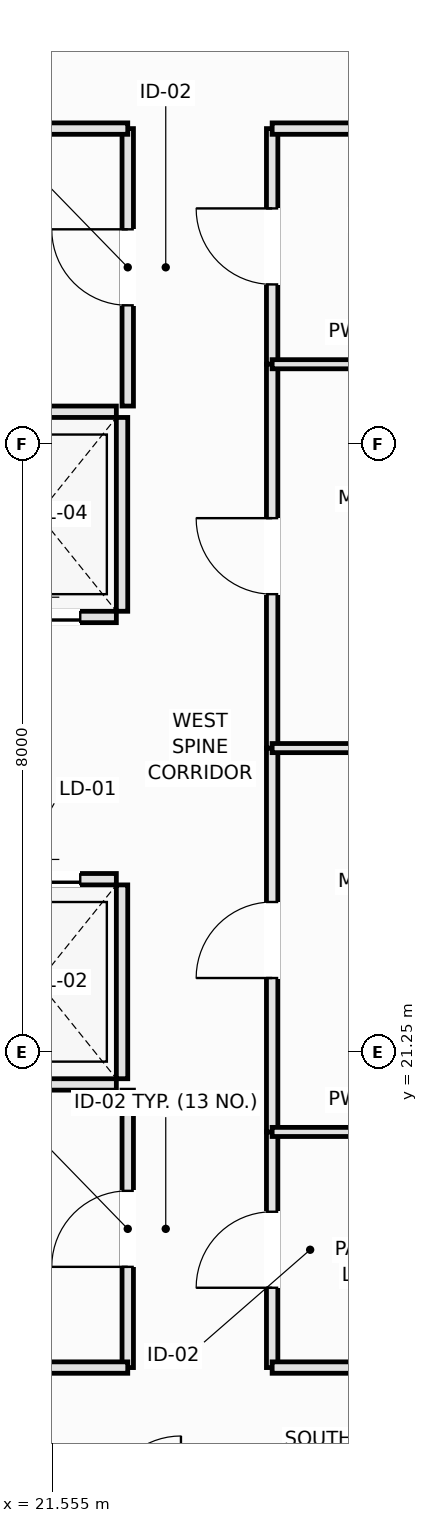
"""IFC4 building model, lengths in metres.
Left out: names, types, materials, properties, quantities, classifications, styles, units other than length and angle.
Written with IfcOpenShell. Run it as: python <this file> out.ifc"""

import sys

from ifc_helpers import new_model, si_unit, direction, frame, frame_2d, origin, place, context, subcontext, project, spatial, rectangle, extrude, element, fill, save


model = new_model("IFC4")
c1 = context("Model", 3, precision=1e-05, world=origin(), true_north=direction((0.0, 1.0)))
c2 = subcontext(c1, "Body", "Model", "MODEL_VIEW")
j1 = project(units=[si_unit("LENGTHUNIT", "METRE"), si_unit("PLANEANGLEUNIT", "RADIAN")], contexts=[c1])
p1 = place(None, origin())
s1 = spatial("IfcSite", under=j1, at=p1, CompositionType="ELEMENT")
p2 = place(p1, origin())
s2 = spatial("IfcBuilding", under=s1, at=p2, CompositionType="ELEMENT")
p3 = place(p2, frame((0.0, 0.0, 39.8)))
s3 = spatial("IfcBuildingStorey", under=s2, at=p3, CompositionType="ELEMENT", Elevation=39.8)
p4 = place(p3, frame((20.35, 20.825, 0.0), z_axis=(0.0, 0.0, 1.0), x_axis=(1.0, 0.0, 0.0)))
e1 = element("IfcWall", 1, at=p4, inside=s3, PredefinedType="PARTITIONING", context=c2, shape_type="SweptSolid", body=[
    extrude(rectangle(XDim=2.05, YDim=0.15, at=frame_2d((1.025, 0.0))), origin(), (0.0, 0.0, 1.0), 3.37),
])
p5 = place(p3, frame((20.35, 23.525, 0.0), z_axis=(0.0, 0.0, 1.0), x_axis=(1.0, 0.0, 0.0)))
e2 = element("IfcWall", 2, at=p5, inside=s3, PredefinedType="PARTITIONING", context=c2, shape_type="SweptSolid", body=[
    extrude(rectangle(XDim=2.05, YDim=0.15, at=frame_2d((1.025, 0.0))), origin(), (0.0, 0.0, 1.0), 3.37),
])
p6 = place(p5, frame((0.475, 0.0, 0.0)))
e3 = element("IfcOpeningElement", 3, at=p6, cuts=e2, PredefinedType="OPENING", context=c2, shape_type="SweptSolid", body=[
    extrude(rectangle(XDim=1.1, YDim=2.2, at=frame_2d((0.55, 1.1))), frame((0.0, 0.085, 0.0), z_axis=(0.0, -1.0, 0.0), x_axis=(1.0, 0.0, 0.0)), (0.0, 0.0, 1.0), 0.17),
])
p7 = place(p3, frame((22.475, 20.9, 0.0), z_axis=(0.0, 0.0, 1.0), x_axis=(0.0, 1.0, 0.0)))
e4 = element("IfcWall", 4, at=p7, inside=s3, PredefinedType="PARTITIONING", context=c2, shape_type="SweptSolid", body=[
    extrude(rectangle(XDim=2.55, YDim=0.15, at=frame_2d((1.275, 0.0))), origin(), (0.0, 0.0, 1.0), 3.37),
])
p8 = place(p3, frame((20.35, 26.975, 0.0), z_axis=(0.0, 0.0, 1.0), x_axis=(1.0, 0.0, 0.0)))
e5 = element("IfcWall", 5, at=p8, inside=s3, PredefinedType="PARTITIONING", context=c2, shape_type="SweptSolid", body=[
    extrude(rectangle(XDim=2.05, YDim=0.15, at=frame_2d((1.025, 0.0))), origin(), (0.0, 0.0, 1.0), 3.37),
])
p9 = place(p8, frame((0.475, 0.0, 0.0)))
e6 = element("IfcOpeningElement", 6, at=p9, cuts=e5, PredefinedType="OPENING", context=c2, shape_type="SweptSolid", body=[
    extrude(rectangle(XDim=1.1, YDim=2.2, at=frame_2d((0.55, 1.1))), frame((0.0, 0.085, 0.0), z_axis=(0.0, -1.0, 0.0), x_axis=(1.0, 0.0, 0.0)), (0.0, 0.0, 1.0), 0.17),
])
p10 = place(p3, frame((20.35, 29.675, 0.0), z_axis=(0.0, 0.0, 1.0), x_axis=(1.0, 0.0, 0.0)))
e7 = element("IfcWall", 7, at=p10, inside=s3, PredefinedType="PARTITIONING", context=c2, shape_type="SweptSolid", body=[
    extrude(rectangle(XDim=2.05, YDim=0.15, at=frame_2d((1.025, 0.0))), origin(), (0.0, 0.0, 1.0), 3.37),
])
p11 = place(p3, frame((22.475, 27.05, 0.0), z_axis=(0.0, 0.0, 1.0), x_axis=(0.0, 1.0, 0.0)))
e8 = element("IfcWall", 8, at=p11, inside=s3, PredefinedType="PARTITIONING", context=c2, shape_type="SweptSolid", body=[
    extrude(rectangle(XDim=2.55, YDim=0.15, at=frame_2d((1.275, 0.0))), origin(), (0.0, 0.0, 1.0), 3.37),
])
p12 = place(p3, frame((22.55, 17.1, 0.0), z_axis=(0.0, 0.0, 1.0), x_axis=(0.0, 1.0, 0.0)))
e9 = element("IfcWall", 9, at=p12, inside=s3, PredefinedType="PARTITIONING", context=c2, shape_type="SweptSolid", body=[
    extrude(rectangle(XDim=3.65, YDim=0.15, at=frame_2d((1.825, 0.0))), origin(), (0.0, 0.0, 1.0), 3.01),
])
p13 = place(p12, frame((1.325, 0.0, 0.0)))
e10 = element("IfcOpeningElement", 10, at=p13, cuts=e9, PredefinedType="OPENING", context=c2, shape_type="SweptSolid", body=[
    extrude(rectangle(XDim=1.0, YDim=2.15, at=frame_2d((0.5, 1.075))), frame((0.0, 0.085, 0.0), z_axis=(0.0, -1.0, 0.0), x_axis=(1.0, 0.0, 0.0)), (0.0, 0.0, 1.0), 0.17),
])
p14 = place(p3, frame((22.55, 29.75, 0.0), z_axis=(0.0, 0.0, 1.0), x_axis=(0.0, 1.0, 0.0)))
e11 = element("IfcWall", 11, at=p14, inside=s3, PredefinedType="PARTITIONING", context=c2, shape_type="SweptSolid", body=[
    extrude(rectangle(XDim=3.65, YDim=0.15, at=frame_2d((1.825, 0.0))), origin(), (0.0, 0.0, 1.0), 3.01),
])
p15 = place(p14, frame((1.325, 0.0, 0.0)))
e12 = element("IfcOpeningElement", 12, at=p15, cuts=e11, PredefinedType="OPENING", context=c2, shape_type="SweptSolid", body=[
    extrude(rectangle(XDim=1.0, YDim=2.15, at=frame_2d((0.5, 1.075))), frame((0.0, 0.085, 0.0), z_axis=(0.0, -1.0, 0.0), x_axis=(1.0, 0.0, 0.0)), (0.0, 0.0, 1.0), 0.17),
])
p16 = place(p3, frame((24.45, 17.1, 0.0), z_axis=(0.0, 0.0, 1.0), x_axis=(0.0, 1.0, 0.0)))
e13 = element("IfcWall", 13, at=p16, inside=s3, PredefinedType="PARTITIONING", context=c2, shape_type="SweptSolid", body=[
    extrude(rectangle(XDim=3.1, YDim=0.15, at=frame_2d((1.55, 0.0))), origin(), (0.0, 0.0, 1.0), 3.37),
])
p17 = place(p16, frame((1.05, 0.0, 0.0)))
e14 = element("IfcOpeningElement", 14, at=p17, cuts=e13, PredefinedType="OPENING", context=c2, shape_type="SweptSolid", body=[
    extrude(rectangle(XDim=1.0, YDim=2.15, at=frame_2d((0.5, 1.075))), frame((0.0, 0.085, 0.0), z_axis=(0.0, -1.0, 0.0), x_axis=(1.0, 0.0, 0.0)), (0.0, 0.0, 1.0), 0.17),
])
p18 = place(p3, frame((24.45, 30.3, 0.0), z_axis=(0.0, 0.0, 1.0), x_axis=(0.0, 1.0, 0.0)))
e15 = element("IfcWall", 15, at=p18, inside=s3, PredefinedType="PARTITIONING", context=c2, shape_type="SweptSolid", body=[
    extrude(rectangle(XDim=3.1, YDim=0.15, at=frame_2d((1.55, 0.0))), origin(), (0.0, 0.0, 1.0), 3.37),
])
p19 = place(p18, frame((1.05, 0.0, 0.0)))
e16 = element("IfcOpeningElement", 16, at=p19, cuts=e15, PredefinedType="OPENING", context=c2, shape_type="SweptSolid", body=[
    extrude(rectangle(XDim=1.0, YDim=2.15, at=frame_2d((0.5, 1.075))), frame((0.0, 0.085, 0.0), z_axis=(0.0, -1.0, 0.0), x_axis=(1.0, 0.0, 0.0)), (0.0, 0.0, 1.0), 0.17),
])
p20 = place(p3, frame((24.45, 20.2, 0.0), z_axis=(0.0, 0.0, 1.0), x_axis=(0.0, 1.0, 0.0)))
e17 = element("IfcWall", 17, at=p20, inside=s3, PredefinedType="PARTITIONING", context=c2, shape_type="SweptSolid", body=[
    extrude(rectangle(XDim=5.05, YDim=0.15, at=frame_2d((2.525, 0.0))), origin(), (0.0, 0.0, 1.0), 3.37),
])
p21 = place(p20, frame((2.025, 0.0, 0.0)))
e18 = element("IfcOpeningElement", 18, at=p21, cuts=e17, PredefinedType="OPENING", context=c2, shape_type="SweptSolid", body=[
    extrude(rectangle(XDim=1.0, YDim=2.15, at=frame_2d((0.5, 1.075))), frame((0.0, 0.085, 0.0), z_axis=(0.0, -1.0, 0.0), x_axis=(1.0, 0.0, 0.0)), (0.0, 0.0, 1.0), 0.17),
])
p22 = place(p3, frame((24.45, 25.25, 0.0), z_axis=(0.0, 0.0, 1.0), x_axis=(0.0, 1.0, 0.0)))
e19 = element("IfcWall", 19, at=p22, inside=s3, PredefinedType="PARTITIONING", context=c2, shape_type="SweptSolid", body=[
    extrude(rectangle(XDim=5.05, YDim=0.15, at=frame_2d((2.525, 0.0))), origin(), (0.0, 0.0, 1.0), 3.37),
])
p23 = place(p22, frame((2.025, 0.0, 0.0)))
e20 = element("IfcOpeningElement", 20, at=p23, cuts=e19, PredefinedType="OPENING", context=c2, shape_type="SweptSolid", body=[
    extrude(rectangle(XDim=1.0, YDim=2.15, at=frame_2d((0.5, 1.075))), frame((0.0, 0.085, 0.0), z_axis=(0.0, -1.0, 0.0), x_axis=(1.0, 0.0, 0.0)), (0.0, 0.0, 1.0), 0.17),
])
p24 = place(p3, frame((19.9, 17.1, 0.0), z_axis=(0.0, 0.0, 1.0), x_axis=(1.0, 0.0, 0.0)))
e21 = element("IfcWall", 21, at=p24, inside=s3, PredefinedType="PARTITIONING", context=c2, shape_type="SweptSolid", body=[
    extrude(rectangle(XDim=2.65, YDim=0.15, at=frame_2d((1.325, 0.0))), origin(), (0.0, 0.0, 1.0), 3.37),
])
p25 = place(p3, frame((24.45, 17.1, 0.0), z_axis=(0.0, 0.0, 1.0), x_axis=(1.0, 0.0, 0.0)))
e22 = element("IfcWall", 22, at=p25, inside=s3, PredefinedType="PARTITIONING", context=c2, shape_type="SweptSolid", body=[
    extrude(rectangle(XDim=2.45, YDim=0.15, at=frame_2d((1.225, 0.0))), origin(), (0.0, 0.0, 1.0), 3.37),
])
p26 = place(p3, frame((19.9, 33.4, 0.0), z_axis=(0.0, 0.0, 1.0), x_axis=(1.0, 0.0, 0.0)))
e23 = element("IfcWall", 23, at=p26, inside=s3, PredefinedType="PARTITIONING", context=c2, shape_type="SweptSolid", body=[
    extrude(rectangle(XDim=2.65, YDim=0.15, at=frame_2d((1.325, 0.0))), origin(), (0.0, 0.0, 1.0), 3.37),
])
p27 = place(p3, frame((24.45, 33.4, 0.0), z_axis=(0.0, 0.0, 1.0), x_axis=(1.0, 0.0, 0.0)))
e24 = element("IfcWall", 24, at=p27, inside=s3, PredefinedType="PARTITIONING", context=c2, shape_type="SweptSolid", body=[
    extrude(rectangle(XDim=2.45, YDim=0.15, at=frame_2d((1.225, 0.0))), origin(), (0.0, 0.0, 1.0), 3.37),
])
for number, where, z_axis, x_axis in (
    (25, (24.45, 20.2, 0.0), (0.0, 0.0, 1.0), (1.0, 0.0, 0.0)),
    (26, (24.45, 30.3, 0.0), (0.0, 0.0, 1.0), (1.0, 0.0, 0.0)),
):
    element("IfcWall", number, at=place(p3, frame(where, z_axis=z_axis, x_axis=x_axis)), inside=s3, PredefinedType="PARTITIONING", context=c2, shape_type="SweptSolid", body=[
        extrude(rectangle(XDim=2.45, YDim=0.12, at=frame_2d((1.225, 0.0))), origin(), (0.0, 0.0, 1.0), 3.37),
    ])
p28 = place(p3, frame((24.45, 25.25, 0.0), z_axis=(0.0, 0.0, 1.0), x_axis=(1.0, 0.0, 0.0)))
e27 = element("IfcWall", 27, at=p28, inside=s3, PredefinedType="PARTITIONING", context=c2, shape_type="SweptSolid", body=[
    extrude(rectangle(XDim=3.05, YDim=0.12, at=frame_2d((1.525, 0.0))), origin(), (0.0, 0.0, 1.0), 2.72),
])
p29 = place(p6, origin())
e28 = element("IfcDoor", 28, at=p29, inside=s3, OperationType="DOUBLE_DOOR_SLIDING", PredefinedType="DOOR", context=c2, shape_type="SweptSolid", body=[
    extrude(rectangle(XDim=1.1, YDim=2.2, at=frame_2d((0.55, 1.1))), frame((0.0, 0.025, 0.0), z_axis=(0.0, -1.0, 0.0), x_axis=(1.0, 0.0, 0.0)), (0.0, 0.0, 1.0), 0.05),
])
fill(e3, e28)
p30 = place(p9, origin())
e29 = element("IfcDoor", 29, at=p30, inside=s3, OperationType="DOUBLE_DOOR_SLIDING", PredefinedType="DOOR", context=c2, shape_type="SweptSolid", body=[
    extrude(rectangle(XDim=1.1, YDim=2.2, at=frame_2d((0.55, 1.1))), frame((0.0, 0.025, 0.0), z_axis=(0.0, -1.0, 0.0), x_axis=(1.0, 0.0, 0.0)), (0.0, 0.0, 1.0), 0.05),
])
fill(e6, e29)
p31 = place(p13, origin())
e30 = element("IfcDoor", 30, at=p31, inside=s3, OperationType="SINGLE_SWING_LEFT", PredefinedType="DOOR", context=c2, shape_type="SweptSolid", body=[
    extrude(rectangle(XDim=1.0, YDim=2.15, at=frame_2d((0.5, 1.075))), frame((0.0, 0.025, 0.0), z_axis=(0.0, -1.0, 0.0), x_axis=(1.0, 0.0, 0.0)), (0.0, 0.0, 1.0), 0.05),
])
fill(e10, e30)
p32 = place(p15, origin())
e31 = element("IfcDoor", 31, at=p32, inside=s3, OperationType="SINGLE_SWING_RIGHT", PredefinedType="DOOR", context=c2, shape_type="SweptSolid", body=[
    extrude(rectangle(XDim=1.0, YDim=2.15, at=frame_2d((0.5, 1.075))), frame((0.0, 0.025, 0.0), z_axis=(0.0, -1.0, 0.0), x_axis=(1.0, 0.0, 0.0)), (0.0, 0.0, 1.0), 0.05),
])
fill(e12, e31)
p33 = place(p17, origin())
e32 = element("IfcDoor", 32, at=p33, inside=s3, OperationType="SINGLE_SWING_LEFT", PredefinedType="DOOR", context=c2, shape_type="SweptSolid", body=[
    extrude(rectangle(XDim=1.0, YDim=2.15, at=frame_2d((0.5, 1.075))), frame((0.0, 0.025, 0.0), z_axis=(0.0, -1.0, 0.0), x_axis=(1.0, 0.0, 0.0)), (0.0, 0.0, 1.0), 0.05),
])
fill(e14, e32)
p34 = place(p19, origin())
e33 = element("IfcDoor", 33, at=p34, inside=s3, OperationType="SINGLE_SWING_RIGHT", PredefinedType="DOOR", context=c2, shape_type="SweptSolid", body=[
    extrude(rectangle(XDim=1.0, YDim=2.15, at=frame_2d((0.5, 1.075))), frame((0.0, 0.025, 0.0), z_axis=(0.0, -1.0, 0.0), x_axis=(1.0, 0.0, 0.0)), (0.0, 0.0, 1.0), 0.05),
])
fill(e16, e33)
p35 = place(p21, origin())
e34 = element("IfcDoor", 34, at=p35, inside=s3, OperationType="SINGLE_SWING_LEFT", PredefinedType="DOOR", context=c2, shape_type="SweptSolid", body=[
    extrude(rectangle(XDim=1.0, YDim=2.15, at=frame_2d((0.5, 1.075))), frame((0.0, 0.025, 0.0), z_axis=(0.0, -1.0, 0.0), x_axis=(1.0, 0.0, 0.0)), (0.0, 0.0, 1.0), 0.05),
])
fill(e18, e34)
p36 = place(p23, origin())
e35 = element("IfcDoor", 35, at=p36, inside=s3, OperationType="SINGLE_SWING_RIGHT", PredefinedType="DOOR", context=c2, shape_type="SweptSolid", body=[
    extrude(rectangle(XDim=1.0, YDim=2.15, at=frame_2d((0.5, 1.075))), frame((0.0, 0.025, 0.0), z_axis=(0.0, -1.0, 0.0), x_axis=(1.0, 0.0, 0.0)), (0.0, 0.0, 1.0), 0.05),
])
fill(e20, e35)
save(model, sys.argv[1])
